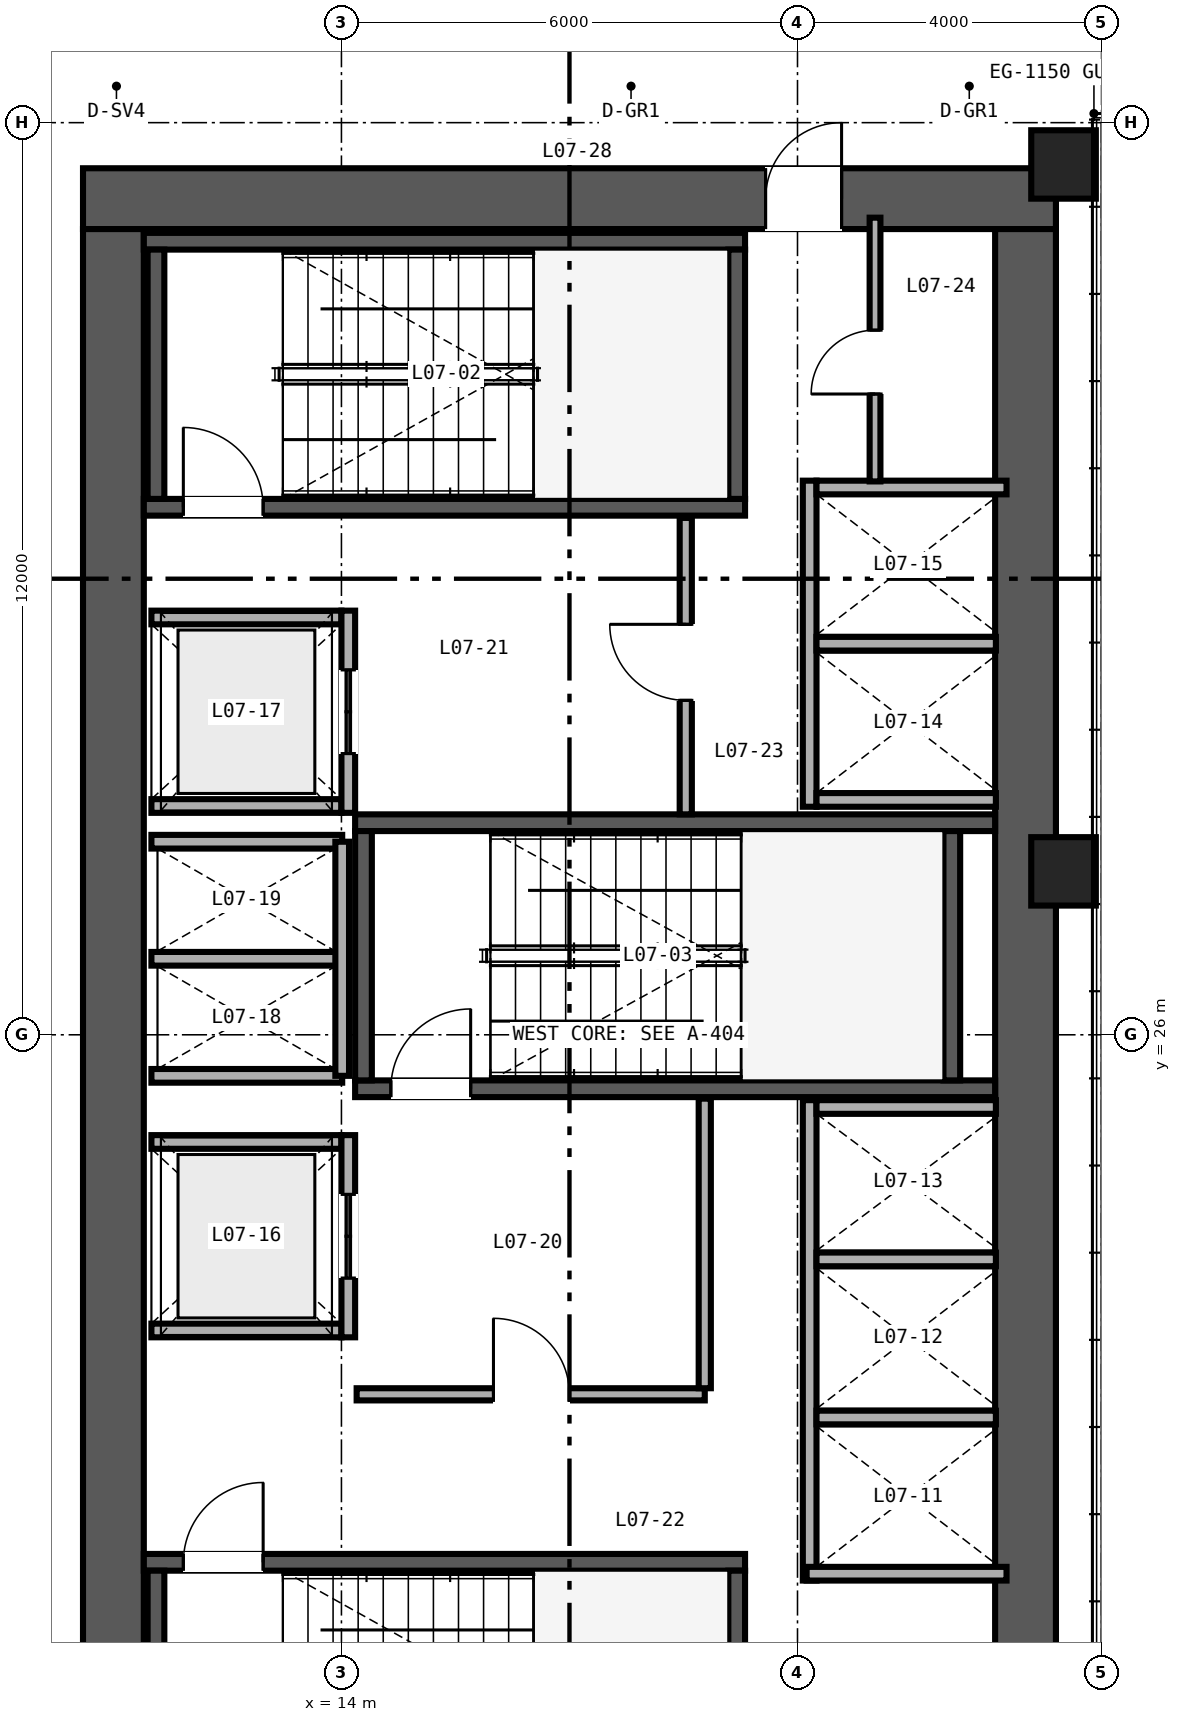
"""IFC4 building model, lengths in metres.
Left out: names, types, materials, properties, quantities, classifications, styles, units other than length and angle.
Written with IfcOpenShell. Run it as: python <this file> out.ifc"""

import sys

from ifc_helpers import new_model, si_unit, direction, frame, frame_2d, origin, origin_2d, place, context, subcontext, project, spatial, rectangle, hollow_rectangle, extrude, source, transform, mapped, element, fill, save


model = new_model("IFC4")
c1 = context("Model", 3, precision=1e-05, world=origin(), true_north=direction((0.0, 1.0)))
c2 = subcontext(c1, "Body", "Model", "MODEL_VIEW")
j1 = project(units=[si_unit("LENGTHUNIT", "METRE"), si_unit("PLANEANGLEUNIT", "RADIAN")], contexts=[c1])
p1 = place(None, origin())
s1 = spatial("IfcSite", under=j1, at=p1, CompositionType="ELEMENT")
p2 = place(p1, origin())
s2 = spatial("IfcBuilding", under=s1, at=p2, CompositionType="ELEMENT")
p3 = place(p2, frame((0.0, 0.0, 34.8)))
s3 = spatial("IfcBuildingStorey", under=s2, at=p3, CompositionType="ELEMENT", Elevation=34.8)
p4 = place(p3, frame((10.6, 37.0, 0.0), z_axis=(0.0, 0.0, 1.0), x_axis=(1.0, 0.0, 0.0)))
e1 = element("IfcWall", 1, at=p4, inside=s3, PredefinedType="SHEAR", context=c2, shape_type="SweptSolid", body=[
    extrude(rectangle(XDim=12.8, YDim=0.8, at=frame_2d((6.4, 0.0))), origin(), (0.0, 0.0, 1.0), 3.35),
])
p5 = place(p4, frame((8.98, 0.0, 0.0)))
e2 = element("IfcOpeningElement", 2, at=p5, cuts=e1, PredefinedType="OPENING", context=c2, shape_type="SweptSolid", body=[
    extrude(rectangle(XDim=1.0, YDim=2.15, at=frame_2d((0.5, 1.075))), frame((0.0, 0.41, 0.0), z_axis=(0.0, -1.0, 0.0), x_axis=(1.0, 0.0, 0.0)), (0.0, 0.0, 1.0), 0.82),
])
for number, where, z_axis, x_axis in (
    (3, (11.0, 15.4, 0.0), (0.0, 0.0, 1.0), (0.0, 1.0, 0.0)),
    (4, (23.0, 15.4, 0.0), (0.0, 0.0, 1.0), (0.0, 1.0, 0.0)),
):
    element("IfcWall", number, at=place(p3, frame(where, z_axis=z_axis, x_axis=x_axis)), inside=s3, PredefinedType="SHEAR", context=c2, shape_type="SweptSolid", body=[
        extrude(rectangle(XDim=21.2, YDim=0.8, at=frame_2d((10.6, 0.0))), origin(), (0.0, 0.0, 1.0), 3.35),
    ])
p6 = place(p3, frame((11.4, 19.06, 0.0), z_axis=(0.0, 0.0, 1.0), x_axis=(1.0, 0.0, 0.0)))
e5 = element("IfcWall", 5, at=p6, inside=s3, PredefinedType="SHEAR", context=c2, shape_type="SweptSolid", body=[
    extrude(rectangle(XDim=7.91, YDim=0.22, at=frame_2d((3.955, 0.0))), origin(), (0.0, 0.0, 1.0), 3.4),
])
p7 = place(p6, frame((0.52, 0.0, 0.0)))
e6 = element("IfcOpeningElement", 6, at=p7, cuts=e5, PredefinedType="OPENING", context=c2, shape_type="SweptSolid", body=[
    extrude(rectangle(XDim=1.05, YDim=2.15, at=frame_2d((0.525, 1.075))), frame((0.0, 0.12, 0.0), z_axis=(0.0, -1.0, 0.0), x_axis=(1.0, 0.0, 0.0)), (0.0, 0.0, 1.0), 0.24),
])
for number, where, z_axis, x_axis in (
    (7, (11.56, 15.67, 0.0), (0.0, 0.0, 1.0), (0.0, 1.0, 0.0)),
    (8, (19.2, 15.67, 0.0), (0.0, 0.0, 1.0), (0.0, 1.0, 0.0)),
):
    element("IfcWall", number, at=place(p3, frame(where, z_axis=z_axis, x_axis=x_axis)), inside=s3, PredefinedType="SHEAR", context=c2, shape_type="SweptSolid", body=[
        extrude(rectangle(XDim=3.28, YDim=0.22, at=frame_2d((1.64, 0.0))), origin(), (0.0, 0.0, 1.0), 3.4),
    ])
p8 = place(p3, frame((11.4, 32.94, 0.0), z_axis=(0.0, 0.0, 1.0), x_axis=(1.0, 0.0, 0.0)))
e9 = element("IfcWall", 9, at=p8, inside=s3, PredefinedType="SHEAR", context=c2, shape_type="SweptSolid", body=[
    extrude(rectangle(XDim=7.91, YDim=0.22, at=frame_2d((3.955, 0.0))), origin(), (0.0, 0.0, 1.0), 3.4),
])
p9 = place(p8, frame((0.52, 0.0, 0.0)))
e10 = element("IfcOpeningElement", 10, at=p9, cuts=e9, PredefinedType="OPENING", context=c2, shape_type="SweptSolid", body=[
    extrude(rectangle(XDim=1.05, YDim=2.15, at=frame_2d((0.525, 1.075))), frame((0.0, 0.12, 0.0), z_axis=(0.0, -1.0, 0.0), x_axis=(1.0, 0.0, 0.0)), (0.0, 0.0, 1.0), 0.24),
])
p10 = place(p3, frame((11.4, 36.44, 0.0), z_axis=(0.0, 0.0, 1.0), x_axis=(1.0, 0.0, 0.0)))
e11 = element("IfcWall", 11, at=p10, inside=s3, PredefinedType="SHEAR", context=c2, shape_type="SweptSolid", body=[
    extrude(rectangle(XDim=7.91, YDim=0.22, at=frame_2d((3.955, 0.0))), origin(), (0.0, 0.0, 1.0), 3.4),
])
for number, where, z_axis, x_axis in (
    (12, (11.56, 33.05, 0.0), (0.0, 0.0, 1.0), (0.0, 1.0, 0.0)),
    (13, (19.2, 33.05, 0.0), (0.0, 0.0, 1.0), (0.0, 1.0, 0.0)),
):
    element("IfcWall", number, at=place(p3, frame(where, z_axis=z_axis, x_axis=x_axis)), inside=s3, PredefinedType="SHEAR", context=c2, shape_type="SweptSolid", body=[
        extrude(rectangle(XDim=3.28, YDim=0.22, at=frame_2d((1.64, 0.0))), origin(), (0.0, 0.0, 1.0), 3.4),
    ])
p11 = place(p3, frame((14.18, 25.29, 0.0), z_axis=(0.0, 0.0, 1.0), x_axis=(1.0, 0.0, 0.0)))
e14 = element("IfcWall", 14, at=p11, inside=s3, PredefinedType="SHEAR", context=c2, shape_type="SweptSolid", body=[
    extrude(rectangle(XDim=8.42, YDim=0.22, at=frame_2d((4.21, 0.0))), origin(), (0.0, 0.0, 1.0), 3.4),
])
p12 = place(p11, frame((0.47, 0.0, 0.0)))
e15 = element("IfcOpeningElement", 15, at=p12, cuts=e14, PredefinedType="OPENING", context=c2, shape_type="SweptSolid", body=[
    extrude(rectangle(XDim=1.05, YDim=2.15, at=frame_2d((0.525, 1.075))), frame((0.0, 0.12, 0.0), z_axis=(0.0, -1.0, 0.0), x_axis=(1.0, 0.0, 0.0)), (0.0, 0.0, 1.0), 0.24),
])
p13 = place(p3, frame((14.18, 28.79, 0.0), z_axis=(0.0, 0.0, 1.0), x_axis=(1.0, 0.0, 0.0)))
e16 = element("IfcWall", 16, at=p13, inside=s3, PredefinedType="SHEAR", context=c2, shape_type="SweptSolid", body=[
    extrude(rectangle(XDim=8.42, YDim=0.22, at=frame_2d((4.21, 0.0))), origin(), (0.0, 0.0, 1.0), 3.4),
])
for number, where, z_axis, x_axis in (
    (17, (14.29, 25.4, 0.0), (0.0, 0.0, 1.0), (0.0, 1.0, 0.0)),
    (18, (22.03, 25.4, 0.0), (0.0, 0.0, 1.0), (0.0, 1.0, 0.0)),
):
    element("IfcWall", number, at=place(p3, frame(where, z_axis=z_axis, x_axis=x_axis)), inside=s3, PredefinedType="SHEAR", context=c2, shape_type="SweptSolid", body=[
        extrude(rectangle(XDim=3.28, YDim=0.22, at=frame_2d((1.64, 0.0))), origin(), (0.0, 0.0, 1.0), 3.4),
    ])
m1 = source(origin(), c2, "Body", "SweptSolid", [
    extrude(hollow_rectangle(XDim=0.85, YDim=0.9, WallThickness=0.04, at=origin_2d()), origin(), (0.0, 0.0, 1.0), 3.35),
])
for number, where, z_axis, x_axis in (
    (19, (23.5, 28.15, 0.0), (0.0, 0.0, 1.0), (1.0, 0.0, 0.0)),
    (20, (23.5, 37.45, 0.0), (0.0, 0.0, 1.0), (1.0, 0.0, 0.0)),
):
    element("IfcColumn", number, at=place(p3, frame(where, z_axis=z_axis, x_axis=x_axis)), inside=s3, PredefinedType="COLUMN", context=c2, shape_type="MappedRepresentation", body=[
        mapped(m1, transform((0.0, 0.0, 0.0), scale=1.0)),
    ])
p14 = place(p3, frame((20.16, 18.82, 0.0), z_axis=(0.0, 0.0, 1.0), x_axis=(0.0, 1.0, 0.0)))
e21 = element("IfcWall", 21, at=p14, inside=s3, PredefinedType="SOLIDWALL", context=c2, shape_type="SweptSolid", body=[
    extrude(rectangle(XDim=6.32, YDim=0.18, at=frame_2d((3.16, 0.0))), origin(), (0.0, 0.0, 1.0), 2.36),
])
p15 = place(p3, frame((20.12, 18.91, 0.0), z_axis=(0.0, 0.0, 1.0), x_axis=(1.0, 0.0, 0.0)))
e22 = element("IfcWall", 22, at=p15, inside=s3, PredefinedType="SOLIDWALL", context=c2, shape_type="SweptSolid", body=[
    extrude(rectangle(XDim=2.63, YDim=0.18, at=frame_2d((1.315, 0.0))), origin(), (0.0, 0.0, 1.0), 3.35),
])
p16 = place(p3, frame((20.25, 25.05, 0.0), z_axis=(0.0, 0.0, 1.0), x_axis=(1.0, 0.0, 0.0)))
e23 = element("IfcWall", 23, at=p16, inside=s3, PredefinedType="SOLIDWALL", context=c2, shape_type="SweptSolid", body=[
    extrude(rectangle(XDim=2.36, YDim=0.18, at=frame_2d((1.18, 0.0))), origin(), (0.0, 0.0, 1.0), 3.35),
])
p17 = place(p3, frame((20.25, 20.965, 0.0), z_axis=(0.0, 0.0, 1.0), x_axis=(1.0, 0.0, 0.0)))
e24 = element("IfcWall", 24, at=p17, inside=s3, PredefinedType="SOLIDWALL", context=c2, shape_type="SweptSolid", body=[
    extrude(rectangle(XDim=2.36, YDim=0.18, at=frame_2d((1.18, 0.0))), origin(), (0.0, 0.0, 1.0), 2.36),
])
p18 = place(p3, frame((20.25, 23.045, 0.0), z_axis=(0.0, 0.0, 1.0), x_axis=(1.0, 0.0, 0.0)))
e25 = element("IfcWall", 25, at=p18, inside=s3, PredefinedType="SOLIDWALL", context=c2, shape_type="SweptSolid", body=[
    extrude(rectangle(XDim=2.36, YDim=0.18, at=frame_2d((1.18, 0.0))), origin(), (0.0, 0.0, 1.0), 3.35),
])
p19 = place(p3, frame((20.16, 29.0, 0.0), z_axis=(0.0, 0.0, 1.0), x_axis=(0.0, 1.0, 0.0)))
e26 = element("IfcWall", 26, at=p19, inside=s3, PredefinedType="SOLIDWALL", context=c2, shape_type="SweptSolid", body=[
    extrude(rectangle(XDim=4.29, YDim=0.18, at=frame_2d((2.145, 0.0))), origin(), (0.0, 0.0, 1.0), 3.35),
])
p20 = place(p3, frame((20.25, 29.09, 0.0), z_axis=(0.0, 0.0, 1.0), x_axis=(1.0, 0.0, 0.0)))
e27 = element("IfcWall", 27, at=p20, inside=s3, PredefinedType="SOLIDWALL", context=c2, shape_type="SweptSolid", body=[
    extrude(rectangle(XDim=2.36, YDim=0.18, at=frame_2d((1.18, 0.0))), origin(), (0.0, 0.0, 1.0), 3.35),
])
p21 = place(p3, frame((20.25, 33.2, 0.0), z_axis=(0.0, 0.0, 1.0), x_axis=(1.0, 0.0, 0.0)))
e28 = element("IfcWall", 28, at=p21, inside=s3, PredefinedType="SOLIDWALL", context=c2, shape_type="SweptSolid", body=[
    extrude(rectangle(XDim=2.5, YDim=0.18, at=frame_2d((1.25, 0.0))), origin(), (0.0, 0.0, 1.0), 3.35),
])
p22 = place(p3, frame((20.25, 31.145, 0.0), z_axis=(0.0, 0.0, 1.0), x_axis=(1.0, 0.0, 0.0)))
e29 = element("IfcWall", 29, at=p22, inside=s3, PredefinedType="SOLIDWALL", context=c2, shape_type="SweptSolid", body=[
    extrude(rectangle(XDim=2.36, YDim=0.18, at=frame_2d((1.18, 0.0))), origin(), (0.0, 0.0, 1.0), 3.35),
])
for number, where, z_axis, x_axis in (
    (30, (11.5, 22.11, 0.0), (0.0, 0.0, 1.0), (1.0, 0.0, 0.0)),
    (31, (11.5, 24.59, 0.0), (0.0, 0.0, 1.0), (1.0, 0.0, 0.0)),
):
    element("IfcWall", number, at=place(p3, frame(where, z_axis=z_axis, x_axis=x_axis)), inside=s3, PredefinedType="SOLIDWALL", context=c2, shape_type="SweptSolid", body=[
        extrude(rectangle(XDim=2.5, YDim=0.18, at=frame_2d((1.25, 0.0))), origin(), (0.0, 0.0, 1.0), 3.35),
    ])
p23 = place(p3, frame((14.09, 22.02, 0.0), z_axis=(0.0, 0.0, 1.0), x_axis=(0.0, 1.0, 0.0)))
e32 = element("IfcWall", 32, at=p23, inside=s3, PredefinedType="SOLIDWALL", context=c2, shape_type="SweptSolid", body=[
    extrude(rectangle(XDim=2.66, YDim=0.18, at=frame_2d((1.33, 0.0))), origin(), (0.0, 0.0, 1.0), 3.35),
])
p24 = place(p23, frame((0.78, 0.0, 0.0)))
e33 = element("IfcOpeningElement", 33, at=p24, cuts=e32, PredefinedType="OPENING", context=c2, shape_type="SweptSolid", body=[
    extrude(rectangle(XDim=1.1, YDim=2.2, at=frame_2d((0.55, 1.1))), frame((0.0, 0.1, 0.0), z_axis=(0.0, -1.0, 0.0), x_axis=(1.0, 0.0, 0.0)), (0.0, 0.0, 1.0), 0.2),
])
for number, where, z_axis, x_axis in (
    (34, (11.5, 29.01, 0.0), (0.0, 0.0, 1.0), (1.0, 0.0, 0.0)),
    (35, (11.5, 31.49, 0.0), (0.0, 0.0, 1.0), (1.0, 0.0, 0.0)),
):
    element("IfcWall", number, at=place(p3, frame(where, z_axis=z_axis, x_axis=x_axis)), inside=s3, PredefinedType="SOLIDWALL", context=c2, shape_type="SweptSolid", body=[
        extrude(rectangle(XDim=2.5, YDim=0.18, at=frame_2d((1.25, 0.0))), origin(), (0.0, 0.0, 1.0), 3.35),
    ])
p25 = place(p3, frame((14.09, 28.92, 0.0), z_axis=(0.0, 0.0, 1.0), x_axis=(0.0, 1.0, 0.0)))
e36 = element("IfcWall", 36, at=p25, inside=s3, PredefinedType="SOLIDWALL", context=c2, shape_type="SweptSolid", body=[
    extrude(rectangle(XDim=2.66, YDim=0.18, at=frame_2d((1.33, 0.0))), origin(), (0.0, 0.0, 1.0), 3.35),
])
p26 = place(p25, frame((0.78, 0.0, 0.0)))
e37 = element("IfcOpeningElement", 37, at=p26, cuts=e36, PredefinedType="OPENING", context=c2, shape_type="SweptSolid", body=[
    extrude(rectangle(XDim=1.1, YDim=2.2, at=frame_2d((0.55, 1.1))), frame((0.0, 0.1, 0.0), z_axis=(0.0, -1.0, 0.0), x_axis=(1.0, 0.0, 0.0)), (0.0, 0.0, 1.0), 0.2),
])
for number, where, z_axis, x_axis in (
    (38, (11.5, 25.46, 0.0), (0.0, 0.0, 1.0), (1.0, 0.0, 0.0)),
    (39, (11.5, 27.0, 0.0), (0.0, 0.0, 1.0), (1.0, 0.0, 0.0)),
    (40, (11.5, 28.54, 0.0), (0.0, 0.0, 1.0), (1.0, 0.0, 0.0)),
):
    element("IfcWall", number, at=place(p3, frame(where, z_axis=z_axis, x_axis=x_axis)), inside=s3, PredefinedType="SOLIDWALL", context=c2, shape_type="SweptSolid", body=[
        extrude(rectangle(XDim=2.51, YDim=0.18, at=frame_2d((1.255, 0.0))), origin(), (0.0, 0.0, 1.0), 3.35),
    ])
p27 = place(p3, frame((14.01, 25.46, 0.0), z_axis=(0.0, 0.0, 1.0), x_axis=(0.0, 1.0, 0.0)))
e41 = element("IfcWall", 41, at=p27, inside=s3, PredefinedType="SOLIDWALL", context=c2, shape_type="SweptSolid", body=[
    extrude(rectangle(XDim=3.08, YDim=0.18, at=frame_2d((1.54, 0.0))), origin(), (0.0, 0.0, 1.0), 3.35),
])
p28 = place(p3, frame((14.2, 21.27, 0.0), z_axis=(0.0, 0.0, 1.0), x_axis=(1.0, 0.0, 0.0)))
e42 = element("IfcWall", 42, at=p28, inside=s3, PredefinedType="PARTITIONING", context=c2, shape_type="SweptSolid", body=[
    extrude(rectangle(XDim=4.58, YDim=0.16, at=frame_2d((2.29, 0.0))), origin(), (0.0, 0.0, 1.0), 3.35),
])
p29 = place(p28, frame((1.8, 0.0, 0.0)))
e43 = element("IfcOpeningElement", 43, at=p29, cuts=e42, PredefinedType="OPENING", context=c2, shape_type="SweptSolid", body=[
    extrude(rectangle(XDim=1.0, YDim=2.15, at=frame_2d((0.5, 1.075))), frame((0.0, 0.09, 0.0), z_axis=(0.0, -1.0, 0.0), x_axis=(1.0, 0.0, 0.0)), (0.0, 0.0, 1.0), 0.18),
])
p30 = place(p3, frame((18.78, 21.35, 0.0), z_axis=(0.0, 0.0, 1.0), x_axis=(0.0, 1.0, 0.0)))
e44 = element("IfcWall", 44, at=p30, inside=s3, PredefinedType="PARTITIONING", context=c2, shape_type="SweptSolid", body=[
    extrude(rectangle(XDim=3.81, YDim=0.16, at=frame_2d((1.905, 0.0))), origin(), (0.0, 0.0, 1.0), 3.35),
])
p31 = place(p3, frame((18.53, 28.9, 0.0), z_axis=(0.0, 0.0, 1.0), x_axis=(0.0, 1.0, 0.0)))
e45 = element("IfcWall", 45, at=p31, inside=s3, PredefinedType="PARTITIONING", context=c2, shape_type="SweptSolid", body=[
    extrude(rectangle(XDim=3.9, YDim=0.16, at=frame_2d((1.95, 0.0))), origin(), (0.0, 0.0, 1.0), 3.35),
])
p32 = place(p31, frame((1.5, 0.0, 0.0)))
e46 = element("IfcOpeningElement", 46, at=p32, cuts=e45, PredefinedType="OPENING", context=c2, shape_type="SweptSolid", body=[
    extrude(rectangle(XDim=1.0, YDim=2.15, at=frame_2d((0.5, 1.075))), frame((0.0, 0.09, 0.0), z_axis=(0.0, -1.0, 0.0), x_axis=(1.0, 0.0, 0.0)), (0.0, 0.0, 1.0), 0.18),
])
p33 = place(p3, frame((21.02, 33.28, 0.0), z_axis=(0.0, 0.0, 1.0), x_axis=(0.0, 1.0, 0.0)))
e47 = element("IfcWall", 47, at=p33, inside=s3, PredefinedType="PARTITIONING", context=c2, shape_type="SweptSolid", body=[
    extrude(rectangle(XDim=3.47, YDim=0.142, at=frame_2d((1.735, 0.0))), origin(), (0.0, 0.0, 1.0), 3.35),
])
p34 = place(p33, frame((1.15, 0.0, 0.0)))
e48 = element("IfcOpeningElement", 48, at=p34, cuts=e47, PredefinedType="OPENING", context=c2, shape_type="SweptSolid", body=[
    extrude(rectangle(XDim=0.84, YDim=2.1, at=frame_2d((0.42, 1.05))), frame((0.0, 0.081, 0.0), z_axis=(0.0, -1.0, 0.0), x_axis=(1.0, 0.0, 0.0)), (0.0, 0.0, 1.0), 0.162),
])
m2 = source(origin(), c2, "Body", "SweptSolid", [
    extrude(rectangle(XDim=1.05, YDim=2.15, at=frame_2d((0.525, 1.075))), frame((0.0, 0.025, 0.0), z_axis=(0.0, -1.0, 0.0), x_axis=(1.0, 0.0, 0.0)), (0.0, 0.0, 1.0), 0.05),
])
p35 = place(p7, origin())
e49 = element("IfcDoor", 49, at=p35, inside=s3, OperationType="SINGLE_SWING_RIGHT", PredefinedType="DOOR", context=c2, shape_type="MappedRepresentation", body=[
    mapped(m2, transform((0.0, 0.0, 0.0), scale=1.0)),
])
fill(e6, e49)
p36 = place(p9, origin())
e50 = element("IfcDoor", 50, at=p36, inside=s3, OperationType="SINGLE_SWING_LEFT", PredefinedType="DOOR", context=c2, shape_type="MappedRepresentation", body=[
    mapped(m2, transform((0.0, 0.0, 0.0), scale=1.0)),
])
fill(e10, e50)
p37 = place(p12, origin())
e51 = element("IfcDoor", 51, at=p37, inside=s3, OperationType="SINGLE_SWING_RIGHT", PredefinedType="DOOR", context=c2, shape_type="MappedRepresentation", body=[
    mapped(m2, transform((0.0, 0.0, 0.0), scale=1.0)),
])
fill(e15, e51)
m3 = source(origin(), c2, "Body", "SweptSolid", [
    extrude(rectangle(XDim=1.1, YDim=2.2, at=frame_2d((0.55, 1.1))), frame((0.0, 0.025, 0.0), z_axis=(0.0, -1.0, 0.0), x_axis=(1.0, 0.0, 0.0)), (0.0, 0.0, 1.0), 0.05),
])
p38 = place(p24, origin())
e52 = element("IfcDoor", 52, at=p38, inside=s3, OperationType="DOUBLE_DOOR_SLIDING", PredefinedType="DOOR", context=c2, shape_type="MappedRepresentation", body=[
    mapped(m3, transform((0.0, 0.0, 0.0), scale=1.0)),
])
fill(e33, e52)
p39 = place(p26, origin())
e53 = element("IfcDoor", 53, at=p39, inside=s3, OperationType="DOUBLE_DOOR_SLIDING", PredefinedType="DOOR", context=c2, shape_type="MappedRepresentation", body=[
    mapped(m3, transform((0.0, 0.0, 0.0), scale=1.0)),
])
fill(e37, e53)
m4 = source(origin(), c2, "Body", "SweptSolid", [
    extrude(rectangle(XDim=1.0, YDim=2.15, at=frame_2d((0.5, 1.075))), frame((0.0, 0.025, 0.0), z_axis=(0.0, -1.0, 0.0), x_axis=(1.0, 0.0, 0.0)), (0.0, 0.0, 1.0), 0.05),
])
p40 = place(p29, origin())
e54 = element("IfcDoor", 54, at=p40, inside=s3, OperationType="SINGLE_SWING_LEFT", PredefinedType="DOOR", context=c2, shape_type="MappedRepresentation", body=[
    mapped(m4, transform((0.0, 0.0, 0.0), scale=1.0)),
])
fill(e43, e54)
p41 = place(p32, origin())
e55 = element("IfcDoor", 55, at=p41, inside=s3, OperationType="SINGLE_SWING_RIGHT", PredefinedType="DOOR", context=c2, shape_type="MappedRepresentation", body=[
    mapped(m4, transform((0.0, 0.0, 0.0), scale=1.0)),
])
fill(e46, e55)
m5 = source(origin(), c2, "Body", "SweptSolid", [
    extrude(rectangle(XDim=0.84, YDim=2.1, at=frame_2d((0.42, 1.05))), frame((0.0, 0.025, 0.0), z_axis=(0.0, -1.0, 0.0), x_axis=(1.0, 0.0, 0.0)), (0.0, 0.0, 1.0), 0.05),
])
p42 = place(p34, origin())
e56 = element("IfcDoor", 56, at=p42, inside=s3, OperationType="SINGLE_SWING_LEFT", PredefinedType="DOOR", context=c2, shape_type="MappedRepresentation", body=[
    mapped(m5, transform((0.0, 0.0, 0.0), scale=1.0)),
])
fill(e48, e56)
p43 = place(p5, origin())
e57 = element("IfcDoor", 57, at=p43, inside=s3, OperationType="SINGLE_SWING_RIGHT", PredefinedType="DOOR", context=c2, shape_type="MappedRepresentation", body=[
    mapped(m4, transform((0.0, 0.0, 0.0), scale=1.0)),
])
fill(e2, e57)
save(model, sys.argv[1])
